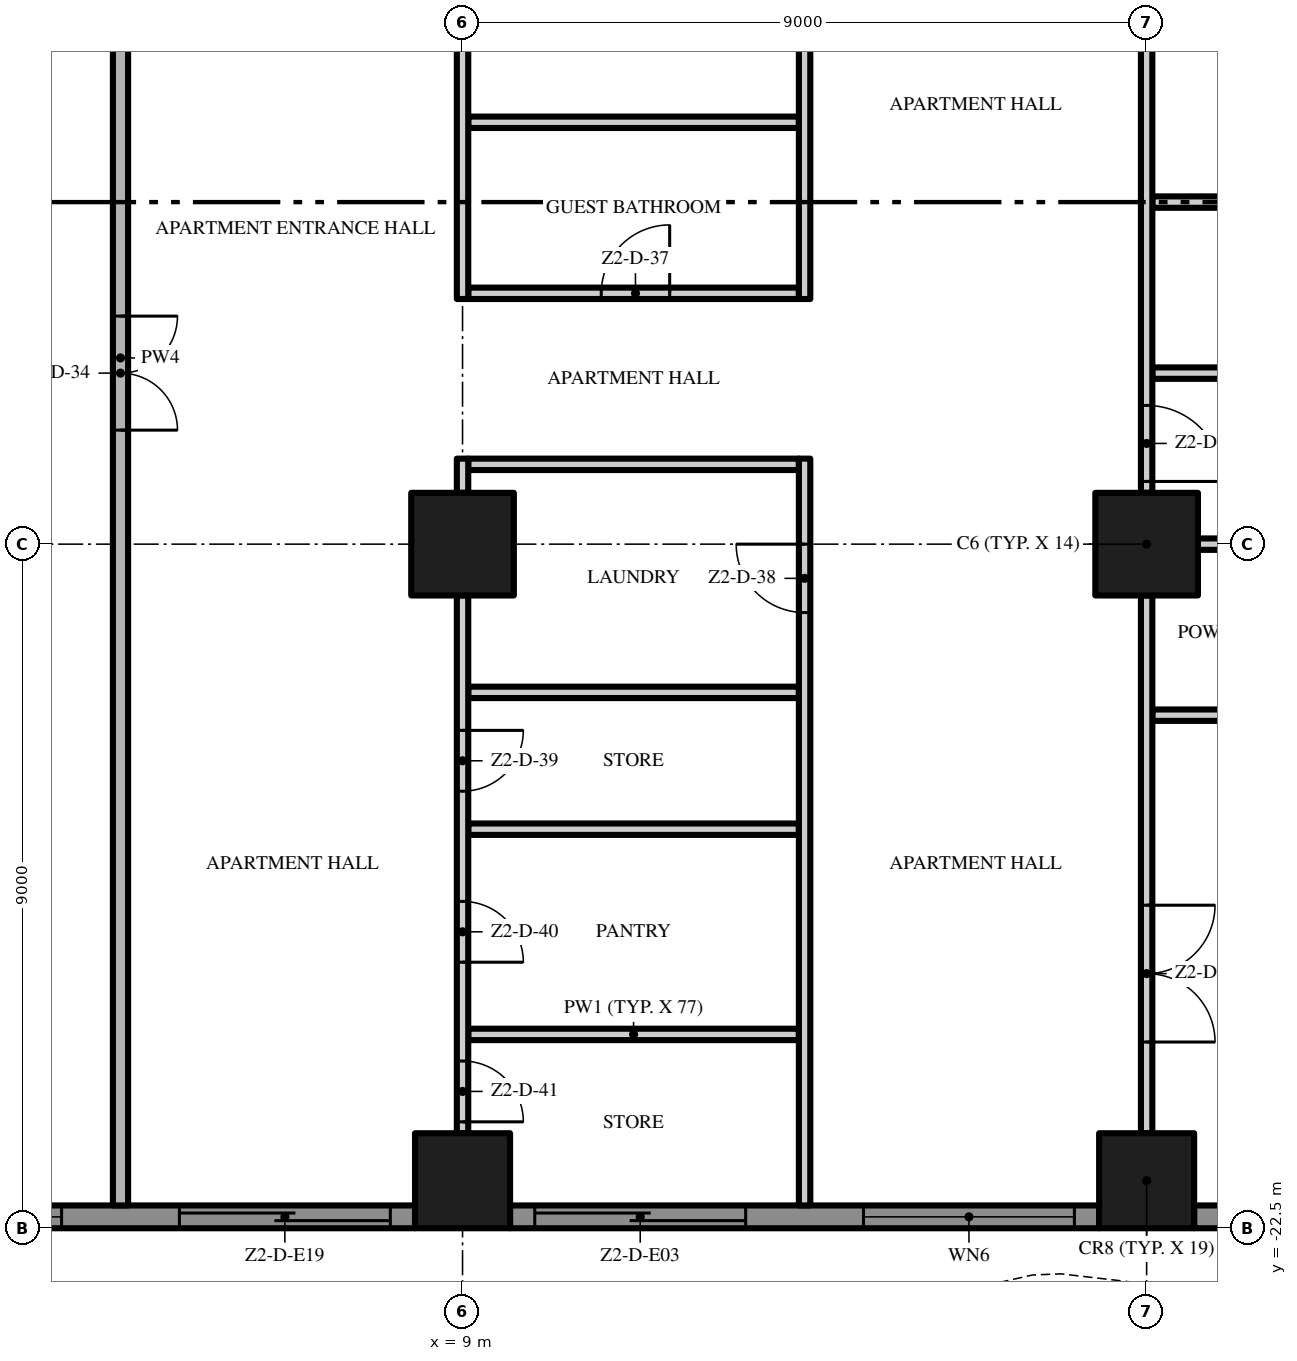
"""IFC4 building model, lengths in metres.
Left out: names, types, materials, properties, quantities, classifications, styles, units other than length and angle.
Written with IfcOpenShell. Run it as: python <this file> out.ifc"""

import sys

from ifc_helpers import new_model, si_unit, direction, frame, frame_2d, origin, origin_2d, place, context, subcontext, project, spatial, polyline, rectangle, outline, extrude, element, fill, save


model = new_model("IFC4")
c1 = context("Model", 3, precision=1e-05, world=origin(), true_north=direction((0.0, 1.0)))
c2 = subcontext(c1, "Body", "Model", "MODEL_VIEW")
j1 = project(units=[si_unit("LENGTHUNIT", "METRE"), si_unit("PLANEANGLEUNIT", "RADIAN")], contexts=[c1])
p1 = place(None, origin())
s1 = spatial("IfcSite", under=j1, at=p1, CompositionType="ELEMENT")
p2 = place(p1, origin())
s2 = spatial("IfcBuilding", under=s1, at=p2, CompositionType="ELEMENT")
p3 = place(p2, frame((0.0, 0.0, 111.2)))
s3 = spatial("IfcBuildingStorey", under=s2, at=p3, CompositionType="ELEMENT", Elevation=111.2)
p4 = place(p3, frame((18.0, -13.5, 0.0), z_axis=(0.0, 0.0, 1.0), x_axis=(1.0, 0.0, 0.0)))
e1 = element("IfcColumn", 1, at=p4, inside=s3, PredefinedType="COLUMN", context=c2, shape_type="SweptSolid", body=[
    extrude(rectangle(XDim=1.35, YDim=1.35, at=origin_2d()), origin(), (0.0, 0.0, 1.0), 3.5),
])
p5 = place(p3, frame((18.0, -21.875, 0.0), z_axis=(0.0, 0.0, 1.0), x_axis=(1.0, 0.0, 0.0)))
e2 = element("IfcColumn", 2, at=p5, inside=s3, PredefinedType="COLUMN", context=c2, shape_type="SweptSolid", body=[
    extrude(rectangle(XDim=1.25, YDim=1.25, at=origin_2d()), origin(), (0.0, 0.0, 1.0), 3.5),
])
p6 = place(p3, frame((9.0, -13.5, 0.0), z_axis=(0.0, 0.0, 1.0), x_axis=(1.0, 0.0, 0.0)))
e3 = element("IfcColumn", 3, at=p6, inside=s3, PredefinedType="COLUMN", context=c2, shape_type="SweptSolid", body=[
    extrude(rectangle(XDim=1.35, YDim=1.35, at=origin_2d()), origin(), (0.0, 0.0, 1.0), 3.5),
])
p7 = place(p3, frame((9.0, -21.875, 0.0), z_axis=(0.0, 0.0, 1.0), x_axis=(1.0, 0.0, 0.0)))
e4 = element("IfcColumn", 4, at=p7, inside=s3, PredefinedType="COLUMN", context=c2, shape_type="SweptSolid", body=[
    extrude(rectangle(XDim=1.25, YDim=1.25, at=origin_2d()), origin(), (0.0, 0.0, 1.0), 3.5),
])
p8 = place(p3, frame((8.375, -22.35, 0.0), z_axis=(0.0, 0.0, 1.0), x_axis=(-1.0, 0.0, 0.0)))
e5 = element("IfcWall", 5, at=p8, inside=s3, PredefinedType="SOLIDWALL", context=c2, shape_type="SweptSolid", body=[
    extrude(rectangle(XDim=7.75, YDim=0.3, at=frame_2d((3.875, 0.0))), origin(), (0.0, 0.0, 1.0), 3.5),
])
p9 = place(p8, frame((4.65, 0.0, 0.45)))
e6 = element("IfcOpeningElement", 6, at=p9, cuts=e5, PredefinedType="OPENING", context=c2, shape_type="SweptSolid", body=[
    extrude(rectangle(XDim=2.775, YDim=2.65, at=frame_2d((1.387, 1.325))), frame((0.0, 0.16, 0.0), z_axis=(0.0, -1.0, 0.0), x_axis=(1.0, 0.0, 0.0)), (0.0, 0.0, 1.0), 0.32),
])
p10 = place(p8, frame((0.325, 0.0, 0.0)))
e7 = element("IfcOpeningElement", 7, at=p10, cuts=e5, PredefinedType="OPENING", context=c2, shape_type="SweptSolid", body=[
    extrude(rectangle(XDim=2.775, YDim=2.4, at=frame_2d((1.387, 1.2))), frame((0.0, 0.16, 0.0), z_axis=(0.0, -1.0, 0.0), x_axis=(1.0, 0.0, 0.0)), (0.0, 0.0, 1.0), 0.32),
])
p11 = place(p3, frame((17.375, -22.35, 0.0), z_axis=(0.0, 0.0, 1.0), x_axis=(-1.0, 0.0, 0.0)))
e8 = element("IfcWall", 8, at=p11, inside=s3, PredefinedType="SOLIDWALL", context=c2, shape_type="SweptSolid", body=[
    extrude(rectangle(XDim=7.75, YDim=0.3, at=frame_2d((3.875, 0.0))), origin(), (0.0, 0.0, 1.0), 3.5),
])
p12 = place(p11, frame((4.65, 0.0, 0.0)))
e9 = element("IfcOpeningElement", 9, at=p12, cuts=e8, PredefinedType="OPENING", context=c2, shape_type="SweptSolid", body=[
    extrude(rectangle(XDim=2.775, YDim=2.4, at=frame_2d((1.387, 1.2))), frame((0.0, 0.16, 0.0), z_axis=(0.0, -1.0, 0.0), x_axis=(1.0, 0.0, 0.0)), (0.0, 0.0, 1.0), 0.32),
])
p13 = place(p11, frame((0.325, 0.0, 0.45)))
e10 = element("IfcOpeningElement", 10, at=p13, cuts=e8, PredefinedType="OPENING", context=c2, shape_type="SweptSolid", body=[
    extrude(rectangle(XDim=2.775, YDim=2.65, at=frame_2d((1.387, 1.325))), frame((0.0, 0.16, 0.0), z_axis=(0.0, -1.0, 0.0), x_axis=(1.0, 0.0, 0.0)), (0.0, 0.0, 1.0), 0.32),
])
p14 = place(p3, frame((22.5, -22.35, 0.0), z_axis=(0.0, 0.0, 1.0), x_axis=(-1.0, 0.0, 0.0)))
e11 = element("IfcWall", 11, at=p14, inside=s3, PredefinedType="SOLIDWALL", context=c2, shape_type="SweptSolid", body=[
    extrude(rectangle(XDim=3.875, YDim=0.3, at=frame_2d((1.938, 0.0))), origin(), (0.0, 0.0, 1.0), 3.5),
])
p15 = place(p14, frame((0.775, 0.0, 0.45)))
e12 = element("IfcOpeningElement", 12, at=p15, cuts=e11, PredefinedType="OPENING", context=c2, shape_type="SweptSolid", body=[
    extrude(rectangle(XDim=2.775, YDim=2.65, at=frame_2d((1.387, 1.325))), frame((0.0, 0.16, 0.0), z_axis=(0.0, -1.0, 0.0), x_axis=(1.0, 0.0, 0.0)), (0.0, 0.0, 1.0), 0.32),
])
p16 = place(p3, origin())
e13 = element("IfcWall", 13, at=p16, inside=s3, PredefinedType="USERDEFINED", context=c2, shape_type="SweptSolid", body=[
    extrude(outline(polyline([(-22.5, -25.149), (-21.0, -25.485), (-20.625, -25.5), (-19.5, -25.369), (-18.0, -24.845), (-16.5, -24.112), (-15.0, -23.451), (-13.5, -23.115), (-13.125, -23.1), (-12.0, -23.231), (-10.5, -23.755), (-9.0, -24.488), (-7.5, -25.149), (-6.0, -25.485), (-5.625, -25.5), (-4.5, -25.369), (-3.0, -24.845), (-1.5, -24.112), (0.0, -23.451), (1.5, -23.115), (1.875, -23.1), (3.0, -23.231), (4.5, -23.755), (6.0, -24.488), (7.5, -25.149), (9.0, -25.485), (9.375, -25.5), (10.5, -25.369), (12.0, -24.845), (13.5, -24.112), (15.0, -23.451), (16.5, -23.115), (16.875, -23.1), (18.0, -23.231), (19.5, -23.755), (21.0, -24.488), (22.5, -25.149), (22.601, -24.92), (21.105, -24.261), (19.596, -23.524), (18.056, -22.986), (16.885, -22.849), (16.467, -22.866), (14.921, -23.213), (13.395, -23.885), (11.904, -24.614), (10.444, -25.124), (9.365, -25.249), (9.033, -25.236), (7.579, -24.91), (6.105, -24.261), (4.596, -23.524), (3.056, -22.986), (1.885, -22.849), (1.467, -22.866), (-0.079, -23.213), (-1.605, -23.885), (-3.096, -24.614), (-4.556, -25.124), (-5.635, -25.249), (-5.967, -25.236), (-7.421, -24.91), (-8.895, -24.261), (-10.404, -23.524), (-11.944, -22.986), (-13.115, -22.849), (-13.533, -22.866), (-15.079, -23.213), (-16.605, -23.885), (-18.096, -24.614), (-19.556, -25.124), (-20.635, -25.249), (-20.967, -25.236), (-22.445, -24.905), (-22.5, -25.149)])), origin(), (0.0, 0.0, 1.0), 0.9),
])
for number, where, z_axis, x_axis in (
    (14, (9.075, -19.95, 0.0), (0.0, 0.0, 1.0), (1.0, 0.0, 0.0)),
    (15, (9.075, -17.25, 0.0), (0.0, 0.0, 1.0), (1.0, 0.0, 0.0)),
):
    element("IfcWall", number, at=place(p3, frame(where, z_axis=z_axis, x_axis=x_axis)), inside=s3, PredefinedType="PARTITIONING", context=c2, shape_type="SweptSolid", body=[
        extrude(rectangle(XDim=4.35, YDim=0.15, at=frame_2d((2.175, 0.0))), origin(), (0.0, 0.0, 1.0), 3.5),
    ])
p17 = place(p3, frame((18.075, -15.75, 0.0), z_axis=(0.0, 0.0, 1.0), x_axis=(1.0, 0.0, 0.0)))
e16 = element("IfcWall", 16, at=p17, inside=s3, PredefinedType="PARTITIONING", context=c2, shape_type="SweptSolid", body=[
    extrude(rectangle(XDim=2.85, YDim=0.15, at=frame_2d((1.425, 0.0))), origin(), (0.0, 0.0, 1.0), 3.5),
])
p18 = place(p3, frame((9.075, -15.45, 0.0), z_axis=(0.0, 0.0, 1.0), x_axis=(1.0, 0.0, 0.0)))
e17 = element("IfcWall", 17, at=p18, inside=s3, PredefinedType="PARTITIONING", context=c2, shape_type="SweptSolid", body=[
    extrude(rectangle(XDim=4.35, YDim=0.15, at=frame_2d((2.175, 0.0))), origin(), (0.0, 0.0, 1.0), 3.5),
])
p19 = place(p3, frame((18.675, -13.5, 0.0), z_axis=(0.0, 0.0, 1.0), x_axis=(1.0, 0.0, 0.0)))
e18 = element("IfcWall", 18, at=p19, inside=s3, PredefinedType="PARTITIONING", context=c2, shape_type="SweptSolid", body=[
    extrude(rectangle(XDim=7.075, YDim=0.15, at=frame_2d((3.538, 0.0))), origin(), (0.0, 0.0, 1.0), 3.5),
])
p20 = place(p3, frame((9.075, -12.45, 0.0), z_axis=(0.0, 0.0, 1.0), x_axis=(1.0, 0.0, 0.0)))
e19 = element("IfcWall", 19, at=p20, inside=s3, PredefinedType="PARTITIONING", context=c2, shape_type="SweptSolid", body=[
    extrude(rectangle(XDim=4.35, YDim=0.15, at=frame_2d((2.175, 0.0))), origin(), (0.0, 0.0, 1.0), 3.5),
])
p21 = place(p3, frame((18.075, -11.25, 0.0), z_axis=(0.0, 0.0, 1.0), x_axis=(1.0, 0.0, 0.0)))
e20 = element("IfcWall", 20, at=p21, inside=s3, PredefinedType="PARTITIONING", context=c2, shape_type="SweptSolid", body=[
    extrude(rectangle(XDim=2.85, YDim=0.15, at=frame_2d((1.425, 0.0))), origin(), (0.0, 0.0, 1.0), 3.5),
])
p22 = place(p3, frame((9.075, -10.2, 0.0), z_axis=(0.0, 0.0, 1.0), x_axis=(1.0, 0.0, 0.0)))
e21 = element("IfcWall", 21, at=p22, inside=s3, PredefinedType="PARTITIONING", context=c2, shape_type="SweptSolid", body=[
    extrude(rectangle(XDim=4.35, YDim=0.15, at=frame_2d((2.175, 0.0))), origin(), (0.0, 0.0, 1.0), 3.5),
])
p23 = place(p22, frame((1.75, 0.0, 0.0)))
e22 = element("IfcOpeningElement", 22, at=p23, cuts=e21, PredefinedType="OPENING", context=c2, shape_type="SweptSolid", body=[
    extrude(rectangle(XDim=0.9, YDim=2.1, at=frame_2d((0.45, 1.05))), frame((0.0, 0.085, 0.0), z_axis=(0.0, -1.0, 0.0), x_axis=(1.0, 0.0, 0.0)), (0.0, 0.0, 1.0), 0.17),
])
p24 = place(p3, frame((18.075, -9.0, 0.0), z_axis=(0.0, 0.0, 1.0), x_axis=(1.0, 0.0, 0.0)))
e23 = element("IfcWall", 23, at=p24, inside=s3, PredefinedType="PARTITIONING", context=c2, shape_type="SweptSolid", body=[
    extrude(rectangle(XDim=2.85, YDim=0.15, at=frame_2d((1.425, 0.0))), origin(), (0.0, 0.0, 1.0), 3.5),
])
p25 = place(p3, frame((9.075, -7.95, 0.0), z_axis=(0.0, 0.0, 1.0), x_axis=(1.0, 0.0, 0.0)))
e24 = element("IfcWall", 24, at=p25, inside=s3, PredefinedType="PARTITIONING", context=c2, shape_type="SweptSolid", body=[
    extrude(rectangle(XDim=4.35, YDim=0.15, at=frame_2d((2.175, 0.0))), origin(), (0.0, 0.0, 1.0), 3.5),
])
p26 = place(p3, frame((4.5, 0.1, 0.0), z_axis=(0.0, 0.0, 1.0), x_axis=(0.0, -1.0, 0.0)))
e25 = element("IfcWall", 25, at=p26, inside=s3, PredefinedType="PARTITIONING", context=c2, shape_type="SweptSolid", body=[
    extrude(rectangle(XDim=22.3, YDim=0.2, at=frame_2d((11.15, 0.0))), origin(), (0.0, 0.0, 1.0), 3.5),
])
p27 = place(p26, frame((10.6, 0.0, 0.0)))
e26 = element("IfcOpeningElement", 26, at=p27, cuts=e25, PredefinedType="OPENING", context=c2, shape_type="SweptSolid", body=[
    extrude(rectangle(XDim=1.5, YDim=2.4, at=frame_2d((0.75, 1.2))), frame((0.0, 0.11, 0.0), z_axis=(0.0, -1.0, 0.0), x_axis=(1.0, 0.0, 0.0)), (0.0, 0.0, 1.0), 0.22),
])
p28 = place(p3, frame((9.0, -14.175, 0.0), z_axis=(0.0, 0.0, 1.0), x_axis=(0.0, -1.0, 0.0)))
e27 = element("IfcWall", 27, at=p28, inside=s3, PredefinedType="PARTITIONING", context=c2, shape_type="SweptSolid", body=[
    extrude(rectangle(XDim=7.075, YDim=0.15, at=frame_2d((3.538, 0.0))), origin(), (0.0, 0.0, 1.0), 3.5),
])
p29 = place(p28, frame((1.775, 0.0, 0.0)))
e28 = element("IfcOpeningElement", 28, at=p29, cuts=e27, PredefinedType="OPENING", context=c2, shape_type="SweptSolid", body=[
    extrude(rectangle(XDim=0.8, YDim=2.0, at=frame_2d((0.4, 1.0))), frame((0.0, 0.085, 0.0), z_axis=(0.0, -1.0, 0.0), x_axis=(1.0, 0.0, 0.0)), (0.0, 0.0, 1.0), 0.17),
])
p30 = place(p28, frame((4.025, 0.0, 0.0)))
e29 = element("IfcOpeningElement", 29, at=p30, cuts=e27, PredefinedType="OPENING", context=c2, shape_type="SweptSolid", body=[
    extrude(rectangle(XDim=0.8, YDim=2.0, at=frame_2d((0.4, 1.0))), frame((0.0, 0.085, 0.0), z_axis=(0.0, -1.0, 0.0), x_axis=(1.0, 0.0, 0.0)), (0.0, 0.0, 1.0), 0.17),
])
p31 = place(p28, frame((6.125, 0.0, 0.0)))
e30 = element("IfcOpeningElement", 30, at=p31, cuts=e27, PredefinedType="OPENING", context=c2, shape_type="SweptSolid", body=[
    extrude(rectangle(XDim=0.8, YDim=2.0, at=frame_2d((0.4, 1.0))), frame((0.0, 0.085, 0.0), z_axis=(0.0, -1.0, 0.0), x_axis=(1.0, 0.0, 0.0)), (0.0, 0.0, 1.0), 0.17),
])
p32 = place(p3, frame((9.0, -12.825, 0.0), z_axis=(0.0, 0.0, 1.0), x_axis=(0.0, 1.0, 0.0)))
e31 = element("IfcWall", 31, at=p32, inside=s3, PredefinedType="PARTITIONING", context=c2, shape_type="SweptSolid", body=[
    extrude(rectangle(XDim=0.45, YDim=0.15, at=frame_2d((0.225, 0.0))), origin(), (0.0, 0.0, 1.0), 3.5),
])
p33 = place(p3, frame((9.0, -5.175, 0.0), z_axis=(0.0, 0.0, 1.0), x_axis=(0.0, -1.0, 0.0)))
e32 = element("IfcWall", 32, at=p33, inside=s3, PredefinedType="PARTITIONING", context=c2, shape_type="SweptSolid", body=[
    extrude(rectangle(XDim=5.1, YDim=0.15, at=frame_2d((2.55, 0.0))), origin(), (0.0, 0.0, 1.0), 3.5),
])
p34 = place(p33, frame((0.15, 0.0, 0.0)))
e33 = element("IfcOpeningElement", 33, at=p34, cuts=e32, PredefinedType="OPENING", context=c2, shape_type="SweptSolid", body=[
    extrude(rectangle(XDim=1.0, YDim=2.4, at=frame_2d((0.5, 1.2))), frame((0.0, 0.085, 0.0), z_axis=(0.0, -1.0, 0.0), x_axis=(1.0, 0.0, 0.0)), (0.0, 0.0, 1.0), 0.17),
])
p35 = place(p3, frame((13.5, -22.2, 0.0), z_axis=(0.0, 0.0, 1.0), x_axis=(0.0, 1.0, 0.0)))
e34 = element("IfcWall", 34, at=p35, inside=s3, PredefinedType="PARTITIONING", context=c2, shape_type="SweptSolid", body=[
    extrude(rectangle(XDim=9.825, YDim=0.15, at=frame_2d((4.912, 0.0))), origin(), (0.0, 0.0, 1.0), 3.5),
])
p36 = place(p35, frame((7.8, 0.0, 0.0)))
e35 = element("IfcOpeningElement", 35, at=p36, cuts=e34, PredefinedType="OPENING", context=c2, shape_type="SweptSolid", body=[
    extrude(rectangle(XDim=0.9, YDim=2.1, at=frame_2d((0.45, 1.05))), frame((0.0, 0.085, 0.0), z_axis=(0.0, -1.0, 0.0), x_axis=(1.0, 0.0, 0.0)), (0.0, 0.0, 1.0), 0.17),
])
p37 = place(p3, frame((13.5, -10.275, 0.0), z_axis=(0.0, 0.0, 1.0), x_axis=(0.0, 1.0, 0.0)))
e36 = element("IfcWall", 36, at=p37, inside=s3, PredefinedType="PARTITIONING", context=c2, shape_type="SweptSolid", body=[
    extrude(rectangle(XDim=10.175, YDim=0.15, at=frame_2d((5.088, 0.0))), origin(), (0.0, 0.0, 1.0), 3.5),
])
p38 = place(p3, frame((18.0, -14.175, 0.0), z_axis=(0.0, 0.0, 1.0), x_axis=(0.0, -1.0, 0.0)))
e37 = element("IfcWall", 37, at=p38, inside=s3, PredefinedType="PARTITIONING", context=c2, shape_type="SweptSolid", body=[
    extrude(rectangle(XDim=7.075, YDim=0.15, at=frame_2d((3.538, 0.0))), origin(), (0.0, 0.0, 1.0), 3.5),
])
p39 = place(p38, frame((4.075, 0.0, 0.0)))
e38 = element("IfcOpeningElement", 38, at=p39, cuts=e37, PredefinedType="OPENING", context=c2, shape_type="SweptSolid", body=[
    extrude(rectangle(XDim=1.8, YDim=2.4, at=frame_2d((0.9, 1.2))), frame((0.0, 0.085, 0.0), z_axis=(0.0, -1.0, 0.0), x_axis=(1.0, 0.0, 0.0)), (0.0, 0.0, 1.0), 0.17),
])
p40 = place(p3, frame((18.0, -5.175, 0.0), z_axis=(0.0, 0.0, 1.0), x_axis=(0.0, -1.0, 0.0)))
e39 = element("IfcWall", 39, at=p40, inside=s3, PredefinedType="PARTITIONING", context=c2, shape_type="SweptSolid", body=[
    extrude(rectangle(XDim=7.65, YDim=0.15, at=frame_2d((3.825, 0.0))), origin(), (0.0, 0.0, 1.0), 3.5),
])
p41 = place(p40, frame((0.15, 0.0, 0.0)))
e40 = element("IfcOpeningElement", 40, at=p41, cuts=e39, PredefinedType="OPENING", context=c2, shape_type="SweptSolid", body=[
    extrude(rectangle(XDim=1.0, YDim=2.4, at=frame_2d((0.5, 1.2))), frame((0.0, 0.085, 0.0), z_axis=(0.0, -1.0, 0.0), x_axis=(1.0, 0.0, 0.0)), (0.0, 0.0, 1.0), 0.17),
])
p42 = place(p40, frame((6.5, 0.0, 0.0)))
e41 = element("IfcOpeningElement", 41, at=p42, cuts=e39, PredefinedType="OPENING", context=c2, shape_type="SweptSolid", body=[
    extrude(rectangle(XDim=1.0, YDim=2.4, at=frame_2d((0.5, 1.2))), frame((0.0, 0.085, 0.0), z_axis=(0.0, -1.0, 0.0), x_axis=(1.0, 0.0, 0.0)), (0.0, 0.0, 1.0), 0.17),
])
p43 = place(p9, origin())
e42 = element("IfcWindow", 42, at=p43, inside=s3, PartitioningType="SINGLE_PANEL", PredefinedType="WINDOW", context=c2, shape_type="SweptSolid", body=[
    extrude(rectangle(XDim=2.775, YDim=2.65, at=frame_2d((1.387, 1.325))), frame((0.0, 0.03, 0.0), z_axis=(0.0, -1.0, 0.0), x_axis=(1.0, 0.0, 0.0)), (0.0, 0.0, 1.0), 0.06),
])
fill(e6, e42)
p44 = place(p10, origin())
e43 = element("IfcDoor", 43, at=p44, inside=s3, OperationType="SINGLE_SWING_LEFT", PredefinedType="DOOR", context=c2, shape_type="SweptSolid", body=[
    extrude(rectangle(XDim=2.775, YDim=2.4, at=frame_2d((1.387, 1.2))), frame((0.0, 0.025, 0.0), z_axis=(0.0, -1.0, 0.0), x_axis=(1.0, 0.0, 0.0)), (0.0, 0.0, 1.0), 0.05),
])
fill(e7, e43)
p45 = place(p12, origin())
e44 = element("IfcDoor", 44, at=p45, inside=s3, OperationType="SINGLE_SWING_LEFT", PredefinedType="DOOR", context=c2, shape_type="SweptSolid", body=[
    extrude(rectangle(XDim=2.775, YDim=2.4, at=frame_2d((1.387, 1.2))), frame((0.0, 0.025, 0.0), z_axis=(0.0, -1.0, 0.0), x_axis=(1.0, 0.0, 0.0)), (0.0, 0.0, 1.0), 0.05),
])
fill(e9, e44)
p46 = place(p13, origin())
e45 = element("IfcWindow", 45, at=p46, inside=s3, PartitioningType="SINGLE_PANEL", PredefinedType="WINDOW", context=c2, shape_type="SweptSolid", body=[
    extrude(rectangle(XDim=2.775, YDim=2.65, at=frame_2d((1.387, 1.325))), frame((0.0, 0.03, 0.0), z_axis=(0.0, -1.0, 0.0), x_axis=(1.0, 0.0, 0.0)), (0.0, 0.0, 1.0), 0.06),
])
fill(e10, e45)
p47 = place(p27, origin())
e46 = element("IfcDoor", 46, at=p47, inside=s3, OperationType="DOUBLE_DOOR_SINGLE_SWING", PredefinedType="DOOR", context=c2, shape_type="SweptSolid", body=[
    extrude(rectangle(XDim=1.5, YDim=2.4, at=frame_2d((0.75, 1.2))), frame((0.0, 0.025, 0.0), z_axis=(0.0, -1.0, 0.0), x_axis=(1.0, 0.0, 0.0)), (0.0, 0.0, 1.0), 0.05),
])
fill(e26, e46)
p48 = place(p23, origin())
e47 = element("IfcDoor", 47, at=p48, inside=s3, OperationType="SINGLE_SWING_RIGHT", PredefinedType="DOOR", context=c2, shape_type="SweptSolid", body=[
    extrude(rectangle(XDim=0.9, YDim=2.1, at=frame_2d((0.45, 1.05))), frame((0.0, 0.025, 0.0), z_axis=(0.0, -1.0, 0.0), x_axis=(1.0, 0.0, 0.0)), (0.0, 0.0, 1.0), 0.05),
])
fill(e22, e47)
p49 = place(p36, origin())
e48 = element("IfcDoor", 48, at=p49, inside=s3, OperationType="SINGLE_SWING_RIGHT", PredefinedType="DOOR", context=c2, shape_type="SweptSolid", body=[
    extrude(rectangle(XDim=0.9, YDim=2.1, at=frame_2d((0.45, 1.05))), frame((0.0, 0.025, 0.0), z_axis=(0.0, -1.0, 0.0), x_axis=(1.0, 0.0, 0.0)), (0.0, 0.0, 1.0), 0.05),
])
fill(e35, e48)
p50 = place(p29, origin())
e49 = element("IfcDoor", 49, at=p50, inside=s3, OperationType="SINGLE_SWING_LEFT", PredefinedType="DOOR", context=c2, shape_type="SweptSolid", body=[
    extrude(rectangle(XDim=0.8, YDim=2.0, at=frame_2d((0.4, 1.0))), frame((0.0, 0.025, 0.0), z_axis=(0.0, -1.0, 0.0), x_axis=(1.0, 0.0, 0.0)), (0.0, 0.0, 1.0), 0.05),
])
fill(e28, e49)
p51 = place(p30, origin())
e50 = element("IfcDoor", 50, at=p51, inside=s3, OperationType="SINGLE_SWING_RIGHT", PredefinedType="DOOR", context=c2, shape_type="SweptSolid", body=[
    extrude(rectangle(XDim=0.8, YDim=2.0, at=frame_2d((0.4, 1.0))), frame((0.0, 0.025, 0.0), z_axis=(0.0, -1.0, 0.0), x_axis=(1.0, 0.0, 0.0)), (0.0, 0.0, 1.0), 0.05),
])
fill(e29, e50)
p52 = place(p31, origin())
e51 = element("IfcDoor", 51, at=p52, inside=s3, OperationType="SINGLE_SWING_RIGHT", PredefinedType="DOOR", context=c2, shape_type="SweptSolid", body=[
    extrude(rectangle(XDim=0.8, YDim=2.0, at=frame_2d((0.4, 1.0))), frame((0.0, 0.025, 0.0), z_axis=(0.0, -1.0, 0.0), x_axis=(1.0, 0.0, 0.0)), (0.0, 0.0, 1.0), 0.05),
])
fill(e30, e51)
p53 = place(p42, origin())
e52 = element("IfcDoor", 52, at=p53, inside=s3, OperationType="SINGLE_SWING_RIGHT", PredefinedType="DOOR", context=c2, shape_type="SweptSolid", body=[
    extrude(rectangle(XDim=1.0, YDim=2.4, at=frame_2d((0.5, 1.2))), frame((0.0, 0.025, 0.0), z_axis=(0.0, -1.0, 0.0), x_axis=(1.0, 0.0, 0.0)), (0.0, 0.0, 1.0), 0.05),
])
fill(e41, e52)
p54 = place(p39, origin())
e53 = element("IfcDoor", 53, at=p54, inside=s3, OperationType="DOUBLE_DOOR_SINGLE_SWING", PredefinedType="DOOR", context=c2, shape_type="SweptSolid", body=[
    extrude(rectangle(XDim=1.8, YDim=2.4, at=frame_2d((0.9, 1.2))), frame((0.0, 0.025, 0.0), z_axis=(0.0, -1.0, 0.0), x_axis=(1.0, 0.0, 0.0)), (0.0, 0.0, 1.0), 0.05),
])
fill(e38, e53)
save(model, sys.argv[1])
